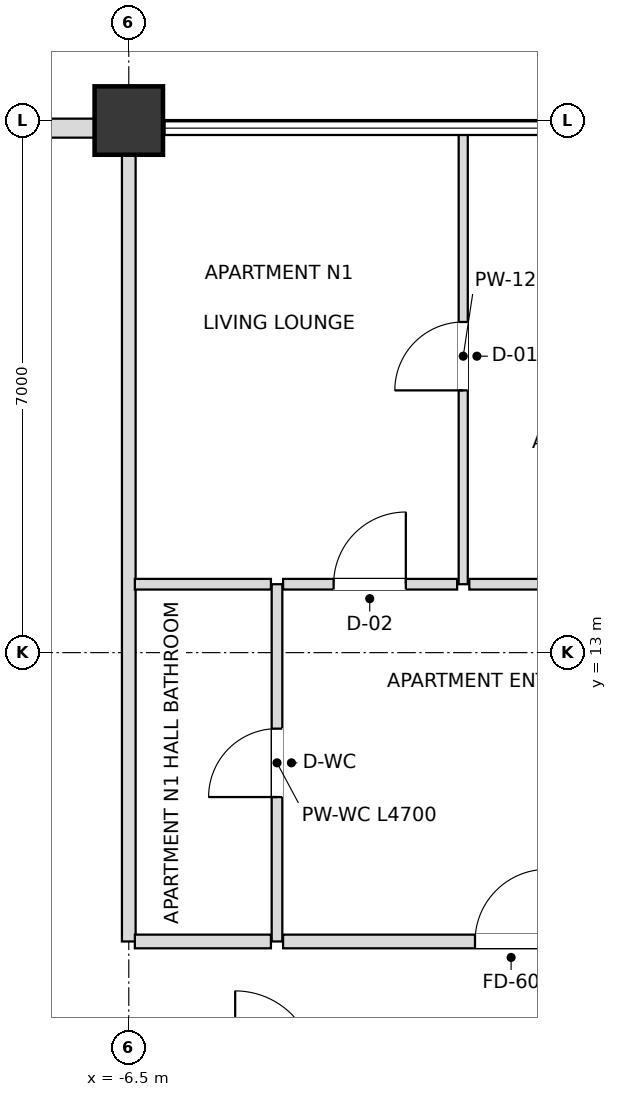
"""IFC4 building model, lengths in metres.
Left out: names, types, materials, properties, quantities, classifications, styles, units other than length and angle.
Written with IfcOpenShell. Run it as: python <this file> out.ifc"""

import sys

from ifc_helpers import new_model, si_unit, direction, frame, frame_2d, origin, origin_2d, place, context, subcontext, project, spatial, rectangle, extrude, element, fill, save


model = new_model("IFC4")
c1 = context("Model", 3, precision=1e-05, world=origin(), true_north=direction((0.0, 1.0)))
c2 = subcontext(c1, "Body", "Model", "MODEL_VIEW")
j1 = project(units=[si_unit("LENGTHUNIT", "METRE"), si_unit("PLANEANGLEUNIT", "RADIAN")], contexts=[c1])
p1 = place(None, origin())
s1 = spatial("IfcSite", under=j1, at=p1, CompositionType="ELEMENT")
p2 = place(p1, origin())
s2 = spatial("IfcBuilding", under=s1, at=p2, CompositionType="ELEMENT")
p3 = place(p2, frame((0.0, 0.0, 247.5)))
s3 = spatial("IfcBuildingStorey", under=s2, at=p3, CompositionType="ELEMENT", Elevation=247.5)
p4 = place(p3, frame((-6.5, 20.0, 0.0), z_axis=(0.0, 0.0, 1.0), x_axis=(1.0, 0.0, 0.0)))
e1 = element("IfcColumn", 1, at=p4, inside=s3, PredefinedType="USERDEFINED", context=c2, shape_type="SweptSolid", body=[
    extrude(rectangle(XDim=0.9, YDim=0.9, at=origin_2d()), origin(), (0.0, 0.0, 1.0), 3.6),
])
p5 = place(p3, frame((-6.945, 19.9, 0.0), z_axis=(0.0, 0.0, 1.0), x_axis=(-1.0, 0.0, 0.0)))
e2 = element("IfcWall", 2, at=p5, inside=s3, PredefinedType="SOLIDWALL", context=c2, shape_type="SweptSolid", body=[
    extrude(rectangle(XDim=4.11, YDim=0.25, at=frame_2d((2.055, 0.0))), origin(), (0.0, 0.0, 1.0), 2.748),
])
p6 = place(p5, frame((1.155, 0.0, 0.72)))
e3 = element("IfcOpeningElement", 3, at=p6, cuts=e2, PredefinedType="OPENING", context=c2, shape_type="SweptSolid", body=[
    extrude(rectangle(XDim=1.8, YDim=1.68, at=frame_2d((0.9, 0.84))), frame((0.0, 0.135, 0.0), z_axis=(0.0, -1.0, 0.0), x_axis=(1.0, 0.0, 0.0)), (0.0, 0.0, 1.0), 0.27),
])
p7 = place(p3, frame((-6.5, 9.2, 0.0), z_axis=(0.0, 0.0, 1.0), x_axis=(0.0, 1.0, 0.0)))
e4 = element("IfcWall", 4, at=p7, inside=s3, PredefinedType="PARTITIONING", context=c2, shape_type="SweptSolid", body=[
    extrude(rectangle(XDim=10.7, YDim=0.18, at=frame_2d((5.35, 0.0))), origin(), (0.0, 0.0, 1.0), 2.826),
])
p8 = place(p3, frame((-4.55, 9.2, 0.0), z_axis=(0.0, 0.0, 1.0), x_axis=(0.0, 1.0, 0.0)))
e5 = element("IfcWall", 5, at=p8, inside=s3, PredefinedType="PARTITIONING", context=c2, shape_type="SweptSolid", body=[
    extrude(rectangle(XDim=4.7, YDim=0.14, at=frame_2d((2.35, 0.0))), origin(), (0.0, 0.0, 1.0), 3.38),
])
p9 = place(p8, frame((1.9, 0.0, 0.0)))
e6 = element("IfcOpeningElement", 6, at=p9, cuts=e5, PredefinedType="OPENING", context=c2, shape_type="SweptSolid", body=[
    extrude(rectangle(XDim=0.9, YDim=2.1, at=frame_2d((0.45, 1.05))), frame((0.0, 0.08, 0.0), z_axis=(0.0, -1.0, 0.0), x_axis=(1.0, 0.0, 0.0)), (0.0, 0.0, 1.0), 0.16),
])
p10 = place(p3, frame((-2.1, 13.9, 0.0), z_axis=(0.0, 0.0, 1.0), x_axis=(0.0, 1.0, 0.0)))
e7 = element("IfcWall", 7, at=p10, inside=s3, PredefinedType="PARTITIONING", context=c2, shape_type="SweptSolid", body=[
    extrude(rectangle(XDim=6.0, YDim=0.12, at=frame_2d((3.0, 0.0))), origin(), (0.0, 0.0, 1.0), 3.018),
])
p11 = place(p10, frame((2.55, 0.0, 0.0)))
e8 = element("IfcOpeningElement", 8, at=p11, cuts=e7, PredefinedType="OPENING", context=c2, shape_type="SweptSolid", body=[
    extrude(rectangle(XDim=0.9, YDim=2.1, at=frame_2d((0.45, 1.05))), frame((0.0, 0.07, 0.0), z_axis=(0.0, -1.0, 0.0), x_axis=(1.0, 0.0, 0.0)), (0.0, 0.0, 1.0), 0.14),
])
p12 = place(p3, frame((-6.42, 9.2, 0.0), z_axis=(0.0, 0.0, 1.0), x_axis=(1.0, 0.0, 0.0)))
e9 = element("IfcWall", 9, at=p12, inside=s3, PredefinedType="PARTITIONING", context=c2, shape_type="SweptSolid", body=[
    extrude(rectangle(XDim=1.79, YDim=0.18, at=frame_2d((0.895, 0.0))), origin(), (0.0, 0.0, 1.0), 3.38),
])
p13 = place(p3, frame((-4.47, 9.2, 0.0), z_axis=(0.0, 0.0, 1.0), x_axis=(1.0, 0.0, 0.0)))
e10 = element("IfcWall", 10, at=p13, inside=s3, PredefinedType="PARTITIONING", context=c2, shape_type="SweptSolid", body=[
    extrude(rectangle(XDim=5.99, YDim=0.18, at=frame_2d((2.995, 0.0))), origin(), (0.0, 0.0, 1.0), 3.38),
])
p14 = place(p13, frame((2.525, 0.0, 0.0)))
e11 = element("IfcOpeningElement", 11, at=p14, cuts=e10, PredefinedType="OPENING", context=c2, shape_type="SweptSolid", body=[
    extrude(rectangle(XDim=0.95, YDim=2.15, at=frame_2d((0.475, 1.075))), frame((0.0, 0.1, 0.0), z_axis=(0.0, -1.0, 0.0), x_axis=(1.0, 0.0, 0.0)), (0.0, 0.0, 1.0), 0.2),
])
p15 = place(p3, frame((-6.42, 13.9, 0.0), z_axis=(0.0, 0.0, 1.0), x_axis=(1.0, 0.0, 0.0)))
e12 = element("IfcWall", 12, at=p15, inside=s3, PredefinedType="PARTITIONING", context=c2, shape_type="SweptSolid", body=[
    extrude(rectangle(XDim=1.79, YDim=0.14, at=frame_2d((0.895, 0.0))), origin(), (0.0, 0.0, 1.0), 3.38),
])
p16 = place(p3, frame((-4.47, 13.9, 0.0), z_axis=(0.0, 0.0, 1.0), x_axis=(1.0, 0.0, 0.0)))
e13 = element("IfcWall", 13, at=p16, inside=s3, PredefinedType="PARTITIONING", context=c2, shape_type="SweptSolid", body=[
    extrude(rectangle(XDim=2.29, YDim=0.14, at=frame_2d((1.145, 0.0))), origin(), (0.0, 0.0, 1.0), 3.38),
])
p17 = place(p16, frame((0.665, 0.0, 0.0)))
e14 = element("IfcOpeningElement", 14, at=p17, cuts=e13, PredefinedType="OPENING", context=c2, shape_type="SweptSolid", body=[
    extrude(rectangle(XDim=0.95, YDim=2.1, at=frame_2d((0.475, 1.05))), frame((0.0, 0.08, 0.0), z_axis=(0.0, -1.0, 0.0), x_axis=(1.0, 0.0, 0.0)), (0.0, 0.0, 1.0), 0.16),
])
p18 = place(p3, frame((-2.02, 13.9, 0.0), z_axis=(0.0, 0.0, 1.0), x_axis=(1.0, 0.0, 0.0)))
e15 = element("IfcWall", 15, at=p18, inside=s3, PredefinedType="PARTITIONING", context=c2, shape_type="SweptSolid", body=[
    extrude(rectangle(XDim=3.54, YDim=0.14, at=frame_2d((1.77, 0.0))), origin(), (0.0, 0.0, 1.0), 3.38),
])
p19 = place(p9, origin())
e16 = element("IfcDoor", 16, at=p19, inside=s3, OperationType="SINGLE_SWING_LEFT", PredefinedType="DOOR", context=c2, shape_type="SweptSolid", body=[
    extrude(rectangle(XDim=0.9, YDim=2.1, at=frame_2d((0.45, 1.05))), frame((0.0, 0.025, 0.0), z_axis=(0.0, -1.0, 0.0), x_axis=(1.0, 0.0, 0.0)), (0.0, 0.0, 1.0), 0.05),
])
fill(e6, e16)
p20 = place(p14, origin())
e17 = element("IfcDoor", 17, at=p20, inside=s3, OperationType="SINGLE_SWING_RIGHT", PredefinedType="DOOR", context=c2, shape_type="SweptSolid", body=[
    extrude(rectangle(XDim=0.95, YDim=2.15, at=frame_2d((0.475, 1.075))), frame((0.0, 0.025, 0.0), z_axis=(0.0, -1.0, 0.0), x_axis=(1.0, 0.0, 0.0)), (0.0, 0.0, 1.0), 0.05),
])
fill(e11, e17)
p21 = place(p17, origin())
e18 = element("IfcDoor", 18, at=p21, inside=s3, OperationType="SINGLE_SWING_RIGHT", PredefinedType="DOOR", context=c2, shape_type="SweptSolid", body=[
    extrude(rectangle(XDim=0.95, YDim=2.1, at=frame_2d((0.475, 1.05))), frame((0.0, 0.025, 0.0), z_axis=(0.0, -1.0, 0.0), x_axis=(1.0, 0.0, 0.0)), (0.0, 0.0, 1.0), 0.05),
])
fill(e14, e18)
p22 = place(p11, origin())
e19 = element("IfcDoor", 19, at=p22, inside=s3, OperationType="SINGLE_SWING_LEFT", PredefinedType="DOOR", context=c2, shape_type="SweptSolid", body=[
    extrude(rectangle(XDim=0.9, YDim=2.1, at=frame_2d((0.45, 1.05))), frame((0.0, 0.025, 0.0), z_axis=(0.0, -1.0, 0.0), x_axis=(1.0, 0.0, 0.0)), (0.0, 0.0, 1.0), 0.05),
])
fill(e8, e19)
save(model, sys.argv[1])
